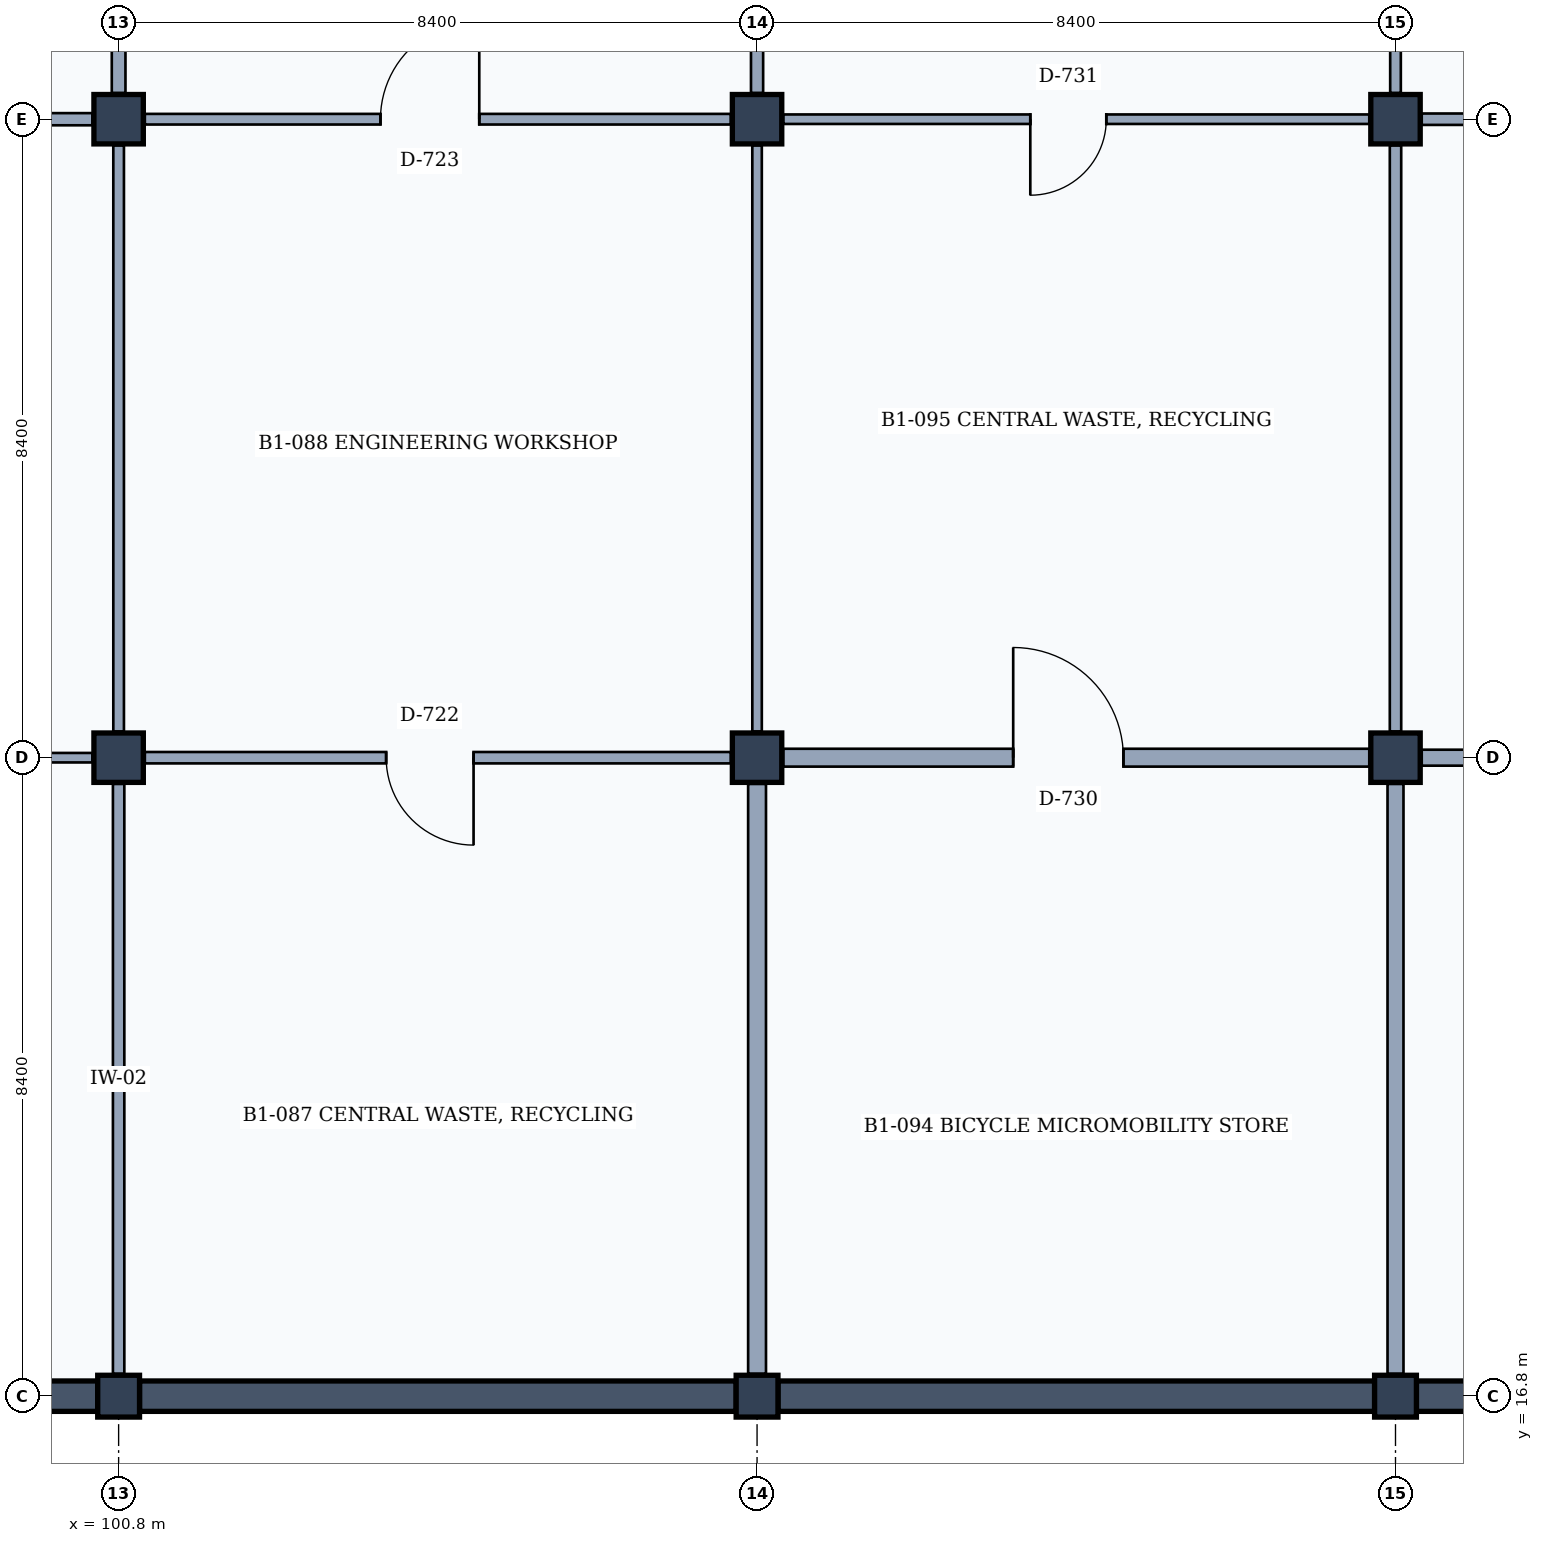
"""IFC4 building model, lengths in metres.
Left out: names, types, materials, properties, quantities, classifications, styles, units other than length and angle.
Written with IfcOpenShell. Run it as: python <this file> out.ifc"""

import sys

from ifc_helpers import new_model, si_unit, direction, frame, frame_2d, origin, origin_2d, place, context, subcontext, project, spatial, rectangle, extrude, element, fill, save


model = new_model("IFC4")
c1 = context("Model", 3, precision=1e-05, world=origin(), true_north=direction((0.0, 1.0)))
c2 = subcontext(c1, "Body", "Model", "MODEL_VIEW")
j1 = project(units=[si_unit("LENGTHUNIT", "METRE"), si_unit("PLANEANGLEUNIT", "RADIAN")], contexts=[c1])
p1 = place(None, origin())
s1 = spatial("IfcSite", under=j1, at=p1, CompositionType="ELEMENT")
p2 = place(p1, origin())
s2 = spatial("IfcBuilding", under=s1, at=p2, CompositionType="ELEMENT")
p3 = place(p2, frame((0.0, 0.0, -4.2)))
s3 = spatial("IfcBuildingStorey", under=s2, at=p3, CompositionType="ELEMENT", Elevation=-4.2)
p4 = place(p3, frame((100.8, 16.8, 0.0), z_axis=(0.0, 0.0, 1.0), x_axis=(1.0, 0.0, 0.0)))
e1 = element("IfcColumn", 1, at=p4, inside=s3, PredefinedType="COLUMN", context=c2, shape_type="SweptSolid", body=[
    extrude(rectangle(XDim=0.55, YDim=0.55, at=origin_2d()), origin(), (0.0, 0.0, 1.0), 4.2),
])
for number, where, z_axis, x_axis in (
    (2, (100.8, 25.2, 0.0), (0.0, 0.0, 1.0), (1.0, 0.0, 0.0)),
    (3, (100.8, 33.6, 0.0), (0.0, 0.0, 1.0), (1.0, 0.0, 0.0)),
):
    element("IfcColumn", number, at=place(p3, frame(where, z_axis=z_axis, x_axis=x_axis)), inside=s3, PredefinedType="COLUMN", context=c2, shape_type="SweptSolid", body=[
        extrude(rectangle(XDim=0.65, YDim=0.65, at=origin_2d()), origin(), (0.0, 0.0, 1.0), 4.2),
    ])
p5 = place(p3, frame((109.2, 16.8, 0.0), z_axis=(0.0, 0.0, 1.0), x_axis=(1.0, 0.0, 0.0)))
e4 = element("IfcColumn", 4, at=p5, inside=s3, PredefinedType="COLUMN", context=c2, shape_type="SweptSolid", body=[
    extrude(rectangle(XDim=0.55, YDim=0.55, at=origin_2d()), origin(), (0.0, 0.0, 1.0), 4.2),
])
for number, where, z_axis, x_axis in (
    (5, (109.2, 25.2, 0.0), (0.0, 0.0, 1.0), (1.0, 0.0, 0.0)),
    (6, (109.2, 33.6, 0.0), (0.0, 0.0, 1.0), (1.0, 0.0, 0.0)),
):
    element("IfcColumn", number, at=place(p3, frame(where, z_axis=z_axis, x_axis=x_axis)), inside=s3, PredefinedType="COLUMN", context=c2, shape_type="SweptSolid", body=[
        extrude(rectangle(XDim=0.65, YDim=0.65, at=origin_2d()), origin(), (0.0, 0.0, 1.0), 4.2),
    ])
p6 = place(p3, frame((117.6, 16.8, 0.0), z_axis=(0.0, 0.0, 1.0), x_axis=(1.0, 0.0, 0.0)))
e7 = element("IfcColumn", 7, at=p6, inside=s3, PredefinedType="COLUMN", context=c2, shape_type="SweptSolid", body=[
    extrude(rectangle(XDim=0.55, YDim=0.55, at=origin_2d()), origin(), (0.0, 0.0, 1.0), 4.2),
])
for number, where, z_axis, x_axis in (
    (8, (117.6, 25.2, 0.0), (0.0, 0.0, 1.0), (1.0, 0.0, 0.0)),
    (9, (117.6, 33.6, 0.0), (0.0, 0.0, 1.0), (1.0, 0.0, 0.0)),
):
    element("IfcColumn", number, at=place(p3, frame(where, z_axis=z_axis, x_axis=x_axis)), inside=s3, PredefinedType="COLUMN", context=c2, shape_type="SweptSolid", body=[
        extrude(rectangle(XDim=0.65, YDim=0.65, at=origin_2d()), origin(), (0.0, 0.0, 1.0), 4.2),
    ])
p7 = place(p3, frame((100.525, 16.8, 0.0), z_axis=(0.0, 0.0, 1.0), x_axis=(-1.0, 0.0, 0.0)))
e10 = element("IfcWall", 10, at=p7, inside=s3, PredefinedType="STANDARD", context=c2, shape_type="SweptSolid", body=[
    extrude(rectangle(XDim=7.85, YDim=0.4, at=frame_2d((3.925, 0.0))), origin(), (0.0, 0.0, 1.0), 3.88),
])
p8 = place(p3, frame((108.925, 16.8, 0.0), z_axis=(0.0, 0.0, 1.0), x_axis=(-1.0, 0.0, 0.0)))
e11 = element("IfcWall", 11, at=p8, inside=s3, PredefinedType="STANDARD", context=c2, shape_type="SweptSolid", body=[
    extrude(rectangle(XDim=7.85, YDim=0.4, at=frame_2d((3.925, 0.0))), origin(), (0.0, 0.0, 1.0), 3.88),
])
p9 = place(p3, frame((117.325, 16.8, 0.0), z_axis=(0.0, 0.0, 1.0), x_axis=(-1.0, 0.0, 0.0)))
e12 = element("IfcWall", 12, at=p9, inside=s3, PredefinedType="STANDARD", context=c2, shape_type="SweptSolid", body=[
    extrude(rectangle(XDim=7.85, YDim=0.4, at=frame_2d((3.925, 0.0))), origin(), (0.0, 0.0, 1.0), 3.88),
])
p10 = place(p3, frame((125.725, 16.8, 0.0), z_axis=(0.0, 0.0, 1.0), x_axis=(-1.0, 0.0, 0.0)))
e13 = element("IfcWall", 13, at=p10, inside=s3, PredefinedType="STANDARD", context=c2, shape_type="SweptSolid", body=[
    extrude(rectangle(XDim=7.85, YDim=0.4, at=frame_2d((3.925, 0.0))), origin(), (0.0, 0.0, 1.0), 3.88),
])
p11 = place(p3, frame((100.8, 17.095, 0.0), z_axis=(0.0, 0.0, 1.0), x_axis=(0.0, 1.0, 0.0)))
e14 = element("IfcWall", 14, at=p11, inside=s3, PredefinedType="PARTITIONING", context=c2, shape_type="SweptSolid", body=[
    extrude(rectangle(XDim=7.76, YDim=0.15, at=frame_2d((3.88, 0.0))), origin(), (0.0, 0.0, 1.0), 3.25),
])
p12 = place(p3, frame((92.745, 25.2, 0.0), z_axis=(0.0, 0.0, 1.0), x_axis=(1.0, 0.0, 0.0)))
e15 = element("IfcWall", 15, at=p12, inside=s3, PredefinedType="PARTITIONING", context=c2, shape_type="SweptSolid", body=[
    extrude(rectangle(XDim=7.71, YDim=0.125, at=frame_2d((3.855, 0.0))), origin(), (0.0, 0.0, 1.0), 2.95),
])
p13 = place(p12, frame((3.025, 0.0, 0.0)))
e16 = element("IfcOpeningElement", 16, at=p13, cuts=e15, PredefinedType="OPENING", context=c2, shape_type="SweptSolid", body=[
    extrude(rectangle(XDim=1.45, YDim=2.35, at=frame_2d((0.725, 1.175))), frame((0.0, 0.073, 0.0), z_axis=(0.0, -1.0, 0.0), x_axis=(1.0, 0.0, 0.0)), (0.0, 0.0, 1.0), 0.145),
])
p14 = place(p3, frame((100.8, 25.545, 0.0), z_axis=(0.0, 0.0, 1.0), x_axis=(0.0, 1.0, 0.0)))
e17 = element("IfcWall", 17, at=p14, inside=s3, PredefinedType="PARTITIONING", context=c2, shape_type="SweptSolid", body=[
    extrude(rectangle(XDim=7.71, YDim=0.14, at=frame_2d((3.855, 0.0))), origin(), (0.0, 0.0, 1.0), 3.25),
])
p15 = place(p3, frame((92.745, 33.6, 0.0), z_axis=(0.0, 0.0, 1.0), x_axis=(1.0, 0.0, 0.0)))
e18 = element("IfcWall", 18, at=p15, inside=s3, PredefinedType="PARTITIONING", context=c2, shape_type="SweptSolid", body=[
    extrude(rectangle(XDim=7.71, YDim=0.16, at=frame_2d((3.855, 0.0))), origin(), (0.0, 0.0, 1.0), 2.95),
])
p16 = place(p15, frame((3.25, 0.0, 0.0)))
e19 = element("IfcOpeningElement", 19, at=p16, cuts=e18, PredefinedType="OPENING", context=c2, shape_type="SweptSolid", body=[
    extrude(rectangle(XDim=1.0, YDim=2.15, at=frame_2d((0.5, 1.075))), frame((0.0, 0.09, 0.0), z_axis=(0.0, -1.0, 0.0), x_axis=(1.0, 0.0, 0.0)), (0.0, 0.0, 1.0), 0.18),
])
p17 = place(p3, frame((100.8, 33.945, 0.0), z_axis=(0.0, 0.0, 1.0), x_axis=(0.0, 1.0, 0.0)))
e20 = element("IfcWall", 20, at=p17, inside=s3, PredefinedType="PARTITIONING", context=c2, shape_type="SweptSolid", body=[
    extrude(rectangle(XDim=7.71, YDim=0.18, at=frame_2d((3.855, 0.0))), origin(), (0.0, 0.0, 1.0), 3.25),
])
p18 = place(p3, frame((109.2, 17.095, 0.0), z_axis=(0.0, 0.0, 1.0), x_axis=(0.0, 1.0, 0.0)))
e21 = element("IfcWall", 21, at=p18, inside=s3, PredefinedType="PARTITIONING", context=c2, shape_type="SweptSolid", body=[
    extrude(rectangle(XDim=7.76, YDim=0.235, at=frame_2d((3.88, 0.0))), origin(), (0.0, 0.0, 1.0), 3.25),
])
p19 = place(p3, frame((101.145, 25.2, 0.0), z_axis=(0.0, 0.0, 1.0), x_axis=(1.0, 0.0, 0.0)))
e22 = element("IfcWall", 22, at=p19, inside=s3, PredefinedType="PARTITIONING", context=c2, shape_type="SweptSolid", body=[
    extrude(rectangle(XDim=7.71, YDim=0.15, at=frame_2d((3.855, 0.0))), origin(), (0.0, 0.0, 1.0), 2.95),
])
p20 = place(p19, frame((3.175, 0.0, 0.0)))
e23 = element("IfcOpeningElement", 23, at=p20, cuts=e22, PredefinedType="OPENING", context=c2, shape_type="SweptSolid", body=[
    extrude(rectangle(XDim=1.15, YDim=2.25, at=frame_2d((0.575, 1.125))), frame((0.0, 0.085, 0.0), z_axis=(0.0, -1.0, 0.0), x_axis=(1.0, 0.0, 0.0)), (0.0, 0.0, 1.0), 0.17),
])
p21 = place(p3, frame((109.2, 25.545, 0.0), z_axis=(0.0, 0.0, 1.0), x_axis=(0.0, 1.0, 0.0)))
e24 = element("IfcWall", 24, at=p21, inside=s3, PredefinedType="PARTITIONING", context=c2, shape_type="SweptSolid", body=[
    extrude(rectangle(XDim=7.71, YDim=0.125, at=frame_2d((3.855, 0.0))), origin(), (0.0, 0.0, 1.0), 3.25),
])
p22 = place(p3, frame((101.145, 33.6, 0.0), z_axis=(0.0, 0.0, 1.0), x_axis=(1.0, 0.0, 0.0)))
e25 = element("IfcWall", 25, at=p22, inside=s3, PredefinedType="PARTITIONING", context=c2, shape_type="SweptSolid", body=[
    extrude(rectangle(XDim=7.71, YDim=0.14, at=frame_2d((3.855, 0.0))), origin(), (0.0, 0.0, 1.0), 2.95),
])
p23 = place(p22, frame((3.1, 0.0, 0.0)))
e26 = element("IfcOpeningElement", 26, at=p23, cuts=e25, PredefinedType="OPENING", context=c2, shape_type="SweptSolid", body=[
    extrude(rectangle(XDim=1.3, YDim=2.2, at=frame_2d((0.65, 1.1))), frame((0.0, 0.08, 0.0), z_axis=(0.0, -1.0, 0.0), x_axis=(1.0, 0.0, 0.0)), (0.0, 0.0, 1.0), 0.16),
])
p24 = place(p3, frame((109.2, 33.945, 0.0), z_axis=(0.0, 0.0, 1.0), x_axis=(0.0, 1.0, 0.0)))
e27 = element("IfcWall", 27, at=p24, inside=s3, PredefinedType="PARTITIONING", context=c2, shape_type="SweptSolid", body=[
    extrude(rectangle(XDim=7.71, YDim=0.16, at=frame_2d((3.855, 0.0))), origin(), (0.0, 0.0, 1.0), 3.25),
])
p25 = place(p3, frame((117.6, 17.095, 0.0), z_axis=(0.0, 0.0, 1.0), x_axis=(0.0, 1.0, 0.0)))
e28 = element("IfcWall", 28, at=p25, inside=s3, PredefinedType="PARTITIONING", context=c2, shape_type="SweptSolid", body=[
    extrude(rectangle(XDim=7.76, YDim=0.21, at=frame_2d((3.88, 0.0))), origin(), (0.0, 0.0, 1.0), 3.25),
])
p26 = place(p3, frame((109.545, 25.2, 0.0), z_axis=(0.0, 0.0, 1.0), x_axis=(1.0, 0.0, 0.0)))
e29 = element("IfcWall", 29, at=p26, inside=s3, PredefinedType="PARTITIONING", context=c2, shape_type="SweptSolid", body=[
    extrude(rectangle(XDim=7.71, YDim=0.235, at=frame_2d((3.855, 0.0))), origin(), (0.0, 0.0, 1.0), 2.95),
])
p27 = place(p26, frame((3.025, 0.0, 0.0)))
e30 = element("IfcOpeningElement", 30, at=p27, cuts=e29, PredefinedType="OPENING", context=c2, shape_type="SweptSolid", body=[
    extrude(rectangle(XDim=1.45, YDim=2.35, at=frame_2d((0.725, 1.175))), frame((0.0, 0.127, 0.0), z_axis=(0.0, -1.0, 0.0), x_axis=(1.0, 0.0, 0.0)), (0.0, 0.0, 1.0), 0.255),
])
p28 = place(p3, frame((117.6, 25.545, 0.0), z_axis=(0.0, 0.0, 1.0), x_axis=(0.0, 1.0, 0.0)))
e31 = element("IfcWall", 31, at=p28, inside=s3, PredefinedType="PARTITIONING", context=c2, shape_type="SweptSolid", body=[
    extrude(rectangle(XDim=7.71, YDim=0.15, at=frame_2d((3.855, 0.0))), origin(), (0.0, 0.0, 1.0), 3.25),
])
p29 = place(p3, frame((109.545, 33.6, 0.0), z_axis=(0.0, 0.0, 1.0), x_axis=(1.0, 0.0, 0.0)))
e32 = element("IfcWall", 32, at=p29, inside=s3, PredefinedType="PARTITIONING", context=c2, shape_type="SweptSolid", body=[
    extrude(rectangle(XDim=7.71, YDim=0.125, at=frame_2d((3.855, 0.0))), origin(), (0.0, 0.0, 1.0), 2.95),
])
p30 = place(p29, frame((3.25, 0.0, 0.0)))
e33 = element("IfcOpeningElement", 33, at=p30, cuts=e32, PredefinedType="OPENING", context=c2, shape_type="SweptSolid", body=[
    extrude(rectangle(XDim=1.0, YDim=2.15, at=frame_2d((0.5, 1.075))), frame((0.0, 0.073, 0.0), z_axis=(0.0, -1.0, 0.0), x_axis=(1.0, 0.0, 0.0)), (0.0, 0.0, 1.0), 0.145),
])
p31 = place(p3, frame((117.6, 33.945, 0.0), z_axis=(0.0, 0.0, 1.0), x_axis=(0.0, 1.0, 0.0)))
e34 = element("IfcWall", 34, at=p31, inside=s3, PredefinedType="PARTITIONING", context=c2, shape_type="SweptSolid", body=[
    extrude(rectangle(XDim=7.71, YDim=0.14, at=frame_2d((3.855, 0.0))), origin(), (0.0, 0.0, 1.0), 3.25),
])
p32 = place(p3, frame((117.945, 25.2, 0.0), z_axis=(0.0, 0.0, 1.0), x_axis=(1.0, 0.0, 0.0)))
e35 = element("IfcWall", 35, at=p32, inside=s3, PredefinedType="PARTITIONING", context=c2, shape_type="SweptSolid", body=[
    extrude(rectangle(XDim=7.71, YDim=0.21, at=frame_2d((3.855, 0.0))), origin(), (0.0, 0.0, 1.0), 2.95),
])
p33 = place(p32, frame((3.0, 0.0, 0.0)))
e36 = element("IfcOpeningElement", 36, at=p33, cuts=e35, PredefinedType="OPENING", context=c2, shape_type="SweptSolid", body=[
    extrude(rectangle(XDim=1.5, YDim=2.3, at=frame_2d((0.75, 1.15))), frame((0.0, 0.115, 0.0), z_axis=(0.0, -1.0, 0.0), x_axis=(1.0, 0.0, 0.0)), (0.0, 0.0, 1.0), 0.23),
])
p34 = place(p3, frame((117.945, 33.6, 0.0), z_axis=(0.0, 0.0, 1.0), x_axis=(1.0, 0.0, 0.0)))
e37 = element("IfcWall", 37, at=p34, inside=s3, PredefinedType="PARTITIONING", context=c2, shape_type="SweptSolid", body=[
    extrude(rectangle(XDim=7.71, YDim=0.15, at=frame_2d((3.855, 0.0))), origin(), (0.0, 0.0, 1.0), 2.95),
])
p35 = place(p34, frame((2.925, 0.0, 0.0)))
e38 = element("IfcOpeningElement", 38, at=p35, cuts=e37, PredefinedType="OPENING", context=c2, shape_type="SweptSolid", body=[
    extrude(rectangle(XDim=1.65, YDim=2.25, at=frame_2d((0.825, 1.125))), frame((0.0, 0.085, 0.0), z_axis=(0.0, -1.0, 0.0), x_axis=(1.0, 0.0, 0.0)), (0.0, 0.0, 1.0), 0.17),
])
p36 = place(p20, frame((1.15, 0.0, 0.0), z_axis=(0.0, 0.0, 1.0), x_axis=(-1.0, 0.0, 0.0)))
e39 = element("IfcDoor", 39, at=p36, inside=s3, OperationType="SINGLE_SWING_LEFT", PredefinedType="DOOR", context=c2, shape_type="SweptSolid", body=[
    extrude(rectangle(XDim=1.15, YDim=2.25, at=frame_2d((0.575, 1.125))), frame((0.0, 0.025, 0.0), z_axis=(0.0, -1.0, 0.0), x_axis=(1.0, 0.0, 0.0)), (0.0, 0.0, 1.0), 0.05),
])
fill(e23, e39)
p37 = place(p23, origin())
e40 = element("IfcDoor", 40, at=p37, inside=s3, OperationType="SINGLE_SWING_RIGHT", PredefinedType="DOOR", context=c2, shape_type="SweptSolid", body=[
    extrude(rectangle(XDim=1.3, YDim=2.2, at=frame_2d((0.65, 1.1))), frame((0.0, 0.025, 0.0), z_axis=(0.0, -1.0, 0.0), x_axis=(1.0, 0.0, 0.0)), (0.0, 0.0, 1.0), 0.05),
])
fill(e26, e40)
p38 = place(p27, origin())
e41 = element("IfcDoor", 41, at=p38, inside=s3, OperationType="SINGLE_SWING_LEFT", PredefinedType="DOOR", context=c2, shape_type="SweptSolid", body=[
    extrude(rectangle(XDim=1.45, YDim=2.35, at=frame_2d((0.725, 1.175))), frame((0.0, 0.025, 0.0), z_axis=(0.0, -1.0, 0.0), x_axis=(1.0, 0.0, 0.0)), (0.0, 0.0, 1.0), 0.05),
])
fill(e30, e41)
p39 = place(p30, frame((1.0, 0.0, 0.0), z_axis=(0.0, 0.0, 1.0), x_axis=(-1.0, 0.0, 0.0)))
e42 = element("IfcDoor", 42, at=p39, inside=s3, OperationType="SINGLE_SWING_RIGHT", PredefinedType="DOOR", context=c2, shape_type="SweptSolid", body=[
    extrude(rectangle(XDim=1.0, YDim=2.15, at=frame_2d((0.5, 1.075))), frame((0.0, 0.025, 0.0), z_axis=(0.0, -1.0, 0.0), x_axis=(1.0, 0.0, 0.0)), (0.0, 0.0, 1.0), 0.05),
])
fill(e33, e42)
save(model, sys.argv[1])
